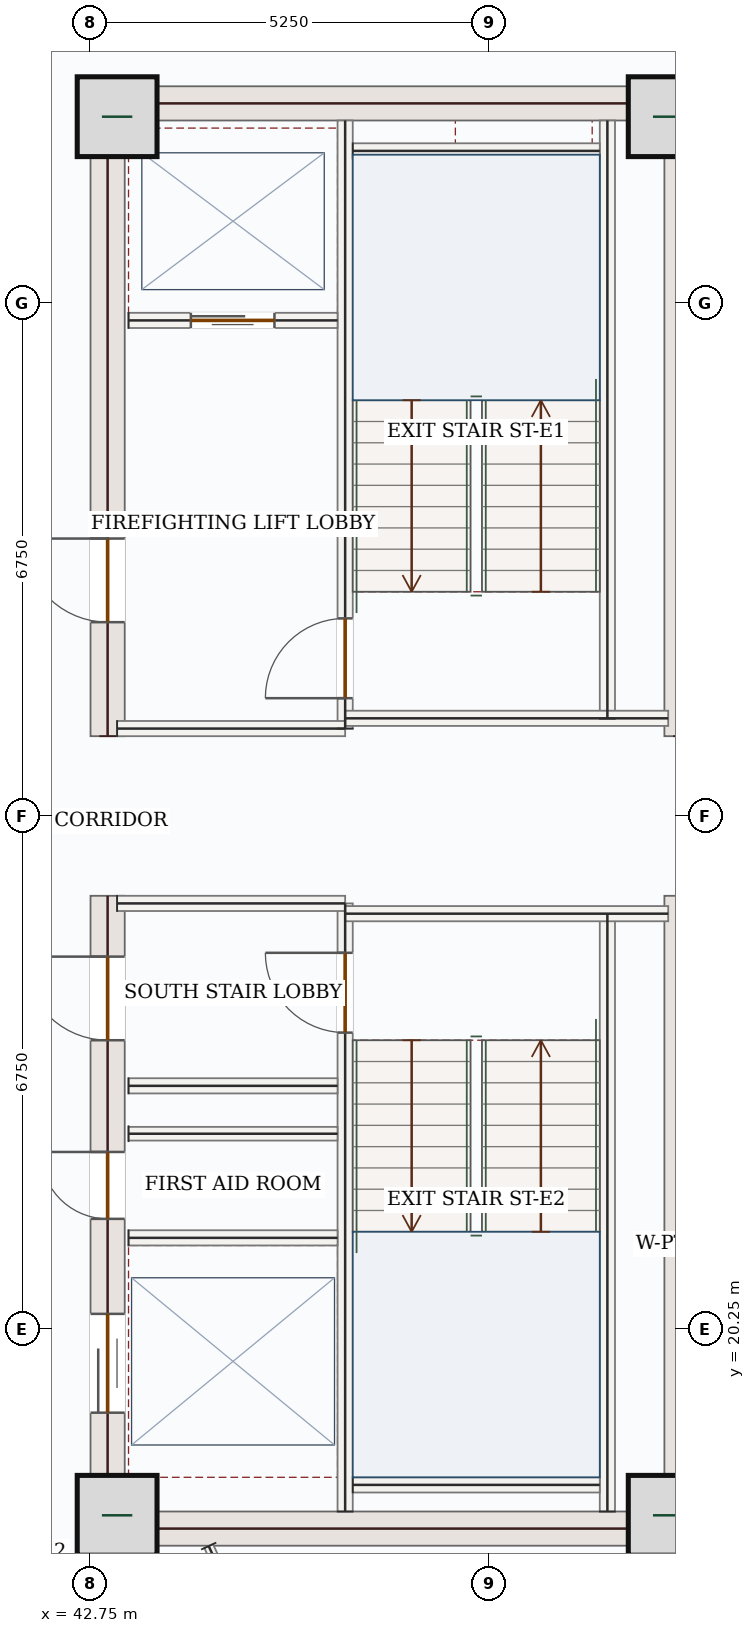
"""IFC4 building model, lengths in metres.
Left out: names, types, materials, properties, quantities, classifications, styles, units other than length and angle.
Written with IfcOpenShell. Run it as: python <this file> out.ifc"""

import sys

from ifc_helpers import new_model, si_unit, direction, frame, frame_2d, origin, origin_2d, place, context, subcontext, project, spatial, rectangle, extrude, source, transform, mapped, element, fill, save


model = new_model("IFC4")
c1 = context("Model", 3, precision=1e-05, world=origin(), true_north=direction((0.0, 1.0)))
c2 = subcontext(c1, "Body", "Model", "MODEL_VIEW")
j1 = project(units=[si_unit("LENGTHUNIT", "METRE"), si_unit("PLANEANGLEUNIT", "RADIAN")], contexts=[c1])
p1 = place(None, origin())
s1 = spatial("IfcSite", under=j1, at=p1, CompositionType="ELEMENT")
p2 = place(p1, origin())
s2 = spatial("IfcBuilding", under=s1, at=p2, CompositionType="ELEMENT")
p3 = place(p2, frame((0.0, 0.0, 246.6)))
s3 = spatial("IfcBuildingStorey", under=s2, at=p3, CompositionType="ELEMENT", Elevation=246.6)
p4 = place(p3, frame((42.975, 17.4, 0.0), z_axis=(0.0, 0.0, 1.0), x_axis=(0.0, 1.0, 0.0)))
e1 = element("IfcWall", 1, at=p4, inside=s3, PredefinedType="SHEAR", context=c2, shape_type="SweptSolid", body=[
    extrude(rectangle(XDim=8.55, YDim=0.45, at=frame_2d((4.275, 0.0))), origin(), (0.0, 0.0, 1.0), 3.5),
])
p5 = place(p4, frame((6.65, 0.0, 0.0)))
e2 = element("IfcOpeningElement", 2, at=p5, cuts=e1, PredefinedType="OPENING", context=c2, shape_type="SweptSolid", body=[
    extrude(rectangle(XDim=1.1, YDim=2.2, at=frame_2d((0.55, 1.1))), frame((0.0, 0.235, 0.0), z_axis=(0.0, -1.0, 0.0), x_axis=(1.0, 0.0, 0.0)), (0.0, 0.0, 1.0), 0.47),
])
p6 = place(p4, frame((1.75, 0.0, 0.0)))
e3 = element("IfcOpeningElement", 3, at=p6, cuts=e1, PredefinedType="OPENING", context=c2, shape_type="SweptSolid", body=[
    extrude(rectangle(XDim=1.3, YDim=2.2, at=frame_2d((0.65, 1.1))), frame((0.0, 0.235, 0.0), z_axis=(0.0, -1.0, 0.0), x_axis=(1.0, 0.0, 0.0)), (0.0, 0.0, 1.0), 0.47),
])
p7 = place(p4, frame((4.3, 0.0, 0.0)))
e4 = element("IfcOpeningElement", 4, at=p7, cuts=e1, PredefinedType="OPENING", context=c2, shape_type="SweptSolid", body=[
    extrude(rectangle(XDim=0.88, YDim=2.1, at=frame_2d((0.44, 1.05))), frame((0.0, 0.235, 0.0), z_axis=(0.0, -1.0, 0.0), x_axis=(1.0, 0.0, 0.0)), (0.0, 0.0, 1.0), 0.47),
])
p8 = place(p3, frame((42.975, 28.05, 0.0), z_axis=(0.0, 0.0, 1.0), x_axis=(0.0, 1.0, 0.0)))
e5 = element("IfcWall", 5, at=p8, inside=s3, PredefinedType="SHEAR", context=c2, shape_type="SweptSolid", body=[
    extrude(rectangle(XDim=8.55, YDim=0.45, at=frame_2d((4.275, 0.0))), origin(), (0.0, 0.0, 1.0), 3.5),
])
p9 = place(p8, frame((1.5, 0.0, 0.0)))
e6 = element("IfcOpeningElement", 6, at=p9, cuts=e5, PredefinedType="OPENING", context=c2, shape_type="SweptSolid", body=[
    extrude(rectangle(XDim=1.1, YDim=2.2, at=frame_2d((0.55, 1.1))), frame((0.0, 0.235, 0.0), z_axis=(0.0, -1.0, 0.0), x_axis=(1.0, 0.0, 0.0)), (0.0, 0.0, 1.0), 0.47),
])
m1 = source(origin(), c2, "Body", "SweptSolid", [
    extrude(rectangle(XDim=8.55, YDim=0.45, at=frame_2d((4.275, 0.0))), origin(), (0.0, 0.0, 1.0), 3.5),
])
for number, where, z_axis, x_axis in (
    (7, (50.525, 17.4, 0.0), (0.0, 0.0, 1.0), (0.0, 1.0, 0.0)),
    (8, (50.525, 28.05, 0.0), (0.0, 0.0, 1.0), (0.0, 1.0, 0.0)),
):
    element("IfcWall", number, at=place(p3, frame(where, z_axis=z_axis, x_axis=x_axis)), inside=s3, PredefinedType="SHEAR", context=c2, shape_type="MappedRepresentation", body=[
        mapped(m1, transform((0.0, 0.0, 0.0), x_axis=(1.0, 0.0, 0.0), y_axis=(0.0, 1.0, 0.0), z_axis=(0.0, 0.0, 1.0), scale=1.0)),
    ])
m2 = source(origin(), c2, "Body", "SweptSolid", [
    extrude(rectangle(XDim=7.1, YDim=0.45, at=frame_2d((3.55, 0.0))), origin(), (0.0, 0.0, 1.0), 3.5),
])
for number, where, z_axis, x_axis in (
    (9, (43.2, 17.625, 0.0), (0.0, 0.0, 1.0), (1.0, 0.0, 0.0)),
    (10, (43.2, 36.375, 0.0), (0.0, 0.0, 1.0), (1.0, 0.0, 0.0)),
):
    element("IfcWall", number, at=place(p3, frame(where, z_axis=z_axis, x_axis=x_axis)), inside=s3, PredefinedType="SHEAR", context=c2, shape_type="MappedRepresentation", body=[
        mapped(m2, transform((0.0, 0.0, 0.0), x_axis=(1.0, 0.0, 0.0), y_axis=(0.0, 1.0, 0.0), z_axis=(0.0, 0.0, 1.0), scale=1.0)),
    ])
m3 = source(origin(), c2, "Body", "SweptSolid", [
    extrude(rectangle(XDim=1.05, YDim=1.05, at=origin_2d()), origin(), (0.0, 0.0, 1.0), 3.75),
])
for number, where, z_axis, x_axis in (
    (11, (43.1, 17.8, 0.0), (0.0, 0.0, 1.0), (1.0, 0.0, 0.0)),
    (12, (50.35, 17.8, 0.0), (0.0, 0.0, 1.0), (1.0, 0.0, 0.0)),
    (13, (43.1, 36.2, 0.0), (0.0, 0.0, 1.0), (1.0, 0.0, 0.0)),
    (14, (50.35, 36.2, 0.0), (0.0, 0.0, 1.0), (1.0, 0.0, 0.0)),
):
    element("IfcColumn", number, at=place(p3, frame(where, z_axis=z_axis, x_axis=x_axis)), inside=s3, PredefinedType="COLUMN", context=c2, shape_type="MappedRepresentation", body=[
        mapped(m3, transform((0.0, 0.0, 0.0), x_axis=(1.0, 0.0, 0.0), y_axis=(0.0, 1.0, 0.0), z_axis=(0.0, 0.0, 1.0), scale=1.0)),
    ])
p10 = place(p3, frame((53.06, 18.458, 0.0), z_axis=(0.0, 0.0, 1.0), x_axis=(-0.707106781187, -0.707106781187, 0.0)))
e15 = element("IfcWall", 15, at=p10, inside=s3, PredefinedType="SOLIDWALL", context=c2, shape_type="SweptSolid", body=[
    extrude(rectangle(XDim=5.258, YDim=0.28, at=frame_2d((2.629, 0.0))), origin(), (0.0, 0.0, 1.0), 3.5),
])
p11 = place(p10, frame((1.879, 0.0, 0.85)))
e16 = element("IfcOpeningElement", 16, at=p11, cuts=e15, PredefinedType="OPENING", context=c2, shape_type="SweptSolid", body=[
    extrude(rectangle(XDim=1.5, YDim=1.5, at=frame_2d((0.75, 0.75))), frame((0.0, 0.15, 0.0), z_axis=(0.0, -1.0, 0.0), x_axis=(1.0, 0.0, 0.0)), (0.0, 0.0, 1.0), 0.3),
])
m4 = source(origin(), c2, "Body", "SweptSolid", [
    extrude(rectangle(XDim=7.87, YDim=0.2, at=frame_2d((3.935, 0.0))), origin(), (0.0, 0.0, 1.0), 3.5),
])
for number, where, z_axis, x_axis in (
    (17, (49.55, 17.85, 0.0), (0.0, 0.0, 1.0), (0.0, 1.0, 0.0)),
    (18, (49.55, 28.28, 0.0), (0.0, 0.0, 1.0), (0.0, 1.0, 0.0)),
):
    element("IfcWall", number, at=place(p3, frame(where, z_axis=z_axis, x_axis=x_axis)), inside=s3, PredefinedType="SOLIDWALL", context=c2, shape_type="MappedRepresentation", body=[
        mapped(m4, transform((0.0, 0.0, 0.0), x_axis=(1.0, 0.0, 0.0), y_axis=(0.0, 1.0, 0.0), z_axis=(0.0, 0.0, 1.0), scale=1.0)),
    ])
p12 = place(p3, frame((46.1, 17.85, 0.0), z_axis=(0.0, 0.0, 1.0), x_axis=(0.0, 1.0, 0.0)))
e19 = element("IfcWall", 19, at=p12, inside=s3, PredefinedType="SOLIDWALL", context=c2, shape_type="SweptSolid", body=[
    extrude(rectangle(XDim=8.0, YDim=0.2, at=frame_2d((4.0, 0.0))), origin(), (0.0, 0.0, 1.0), 3.5),
])
p13 = place(p12, frame((6.3, 0.0, 0.0)))
e20 = element("IfcOpeningElement", 20, at=p13, cuts=e19, PredefinedType="OPENING", context=c2, shape_type="SweptSolid", body=[
    extrude(rectangle(XDim=1.05, YDim=2.15, at=frame_2d((0.525, 1.075))), frame((0.0, 0.11, 0.0), z_axis=(0.0, -1.0, 0.0), x_axis=(1.0, 0.0, 0.0)), (0.0, 0.0, 1.0), 0.22),
])
p14 = place(p3, frame((46.1, 28.15, 0.0), z_axis=(0.0, 0.0, 1.0), x_axis=(0.0, 1.0, 0.0)))
e21 = element("IfcWall", 21, at=p14, inside=s3, PredefinedType="SOLIDWALL", context=c2, shape_type="SweptSolid", body=[
    extrude(rectangle(XDim=8.0, YDim=0.2, at=frame_2d((4.0, 0.0))), origin(), (0.0, 0.0, 1.0), 3.5),
])
p15 = place(p14, frame((0.4, 0.0, 0.0)))
e22 = element("IfcOpeningElement", 22, at=p15, cuts=e21, PredefinedType="OPENING", context=c2, shape_type="SweptSolid", body=[
    extrude(rectangle(XDim=1.05, YDim=2.15, at=frame_2d((0.525, 1.075))), frame((0.0, 0.11, 0.0), z_axis=(0.0, -1.0, 0.0), x_axis=(1.0, 0.0, 0.0)), (0.0, 0.0, 1.0), 0.22),
])
m5 = source(origin(), c2, "Body", "SweptSolid", [
    extrude(rectangle(XDim=3.0, YDim=0.2, at=frame_2d((1.5, 0.0))), origin(), (0.0, 0.0, 1.0), 3.5),
])
p16 = place(p3, frame((43.1, 25.85, 0.0), z_axis=(0.0, 0.0, 1.0), x_axis=(1.0, 0.0, 0.0)))
e23 = element("IfcWall", 23, at=p16, inside=s3, PredefinedType="SOLIDWALL", context=c2, shape_type="MappedRepresentation", body=[
    mapped(m5, transform((0.0, 0.0, 0.0), x_axis=(1.0, 0.0, 0.0), y_axis=(0.0, 1.0, 0.0), z_axis=(0.0, 0.0, 1.0), scale=1.0)),
])
m6 = source(origin(), c2, "Body", "SweptSolid", [
    extrude(rectangle(XDim=4.25, YDim=0.2, at=frame_2d((2.125, 0.0))), origin(), (0.0, 0.0, 1.0), 3.5),
])
p17 = place(p3, frame((46.1, 25.715, 0.0), z_axis=(0.0, 0.0, 1.0), x_axis=(1.0, 0.0, 0.0)))
e24 = element("IfcWall", 24, at=p17, inside=s3, PredefinedType="SOLIDWALL", context=c2, shape_type="MappedRepresentation", body=[
    mapped(m6, transform((0.0, 0.0, 0.0), x_axis=(1.0, 0.0, 0.0), y_axis=(0.0, 1.0, 0.0), z_axis=(0.0, 0.0, 1.0), scale=1.0)),
])
p18 = place(p3, frame((43.1, 28.15, 0.0), z_axis=(0.0, 0.0, 1.0), x_axis=(1.0, 0.0, 0.0)))
e25 = element("IfcWall", 25, at=p18, inside=s3, PredefinedType="SOLIDWALL", context=c2, shape_type="MappedRepresentation", body=[
    mapped(m5, transform((0.0, 0.0, 0.0), x_axis=(1.0, 0.0, 0.0), y_axis=(0.0, 1.0, 0.0), z_axis=(0.0, 0.0, 1.0), scale=1.0)),
])
p19 = place(p3, frame((46.1, 28.285, 0.0), z_axis=(0.0, 0.0, 1.0), x_axis=(1.0, 0.0, 0.0)))
e26 = element("IfcWall", 26, at=p19, inside=s3, PredefinedType="SOLIDWALL", context=c2, shape_type="MappedRepresentation", body=[
    mapped(m6, transform((0.0, 0.0, 0.0), x_axis=(1.0, 0.0, 0.0), y_axis=(0.0, 1.0, 0.0), z_axis=(0.0, 0.0, 1.0), scale=1.0)),
])
m7 = source(origin(), c2, "Body", "SweptSolid", [
    extrude(rectangle(XDim=3.25, YDim=0.2, at=frame_2d((1.625, 0.0))), origin(), (0.0, 0.0, 1.0), 3.5),
])
for number, where, z_axis, x_axis in (
    (27, (46.2, 35.75, 0.0), (0.0, 0.0, 1.0), (1.0, 0.0, 0.0)),
    (28, (46.2, 18.2, 0.0), (0.0, 0.0, 1.0), (1.0, 0.0, 0.0)),
):
    element("IfcWall", number, at=place(p3, frame(where, z_axis=z_axis, x_axis=x_axis)), inside=s3, PredefinedType="SOLIDWALL", context=c2, shape_type="MappedRepresentation", body=[
        mapped(m7, transform((0.0, 0.0, 0.0), x_axis=(1.0, 0.0, 0.0), y_axis=(0.0, 1.0, 0.0), z_axis=(0.0, 0.0, 1.0), scale=1.0)),
    ])
p20 = place(p3, frame((43.25, 33.52, 0.0), z_axis=(0.0, 0.0, 1.0), x_axis=(1.0, 0.0, 0.0)))
e29 = element("IfcWall", 29, at=p20, inside=s3, PredefinedType="SOLIDWALL", context=c2, shape_type="SweptSolid", body=[
    extrude(rectangle(XDim=2.75, YDim=0.2, at=frame_2d((1.375, 0.0))), origin(), (0.0, 0.0, 1.0), 3.5),
])
p21 = place(p20, frame((0.82, 0.0, 0.0)))
e30 = element("IfcOpeningElement", 30, at=p21, cuts=e29, PredefinedType="OPENING", context=c2, shape_type="SweptSolid", body=[
    extrude(rectangle(XDim=1.1, YDim=2.15, at=frame_2d((0.55, 1.075))), frame((0.0, 0.11, 0.0), z_axis=(0.0, -1.0, 0.0), x_axis=(1.0, 0.0, 0.0)), (0.0, 0.0, 1.0), 0.22),
])
m8 = source(origin(), c2, "Body", "SweptSolid", [
    extrude(rectangle(XDim=2.75, YDim=0.2, at=frame_2d((1.375, 0.0))), origin(), (0.0, 0.0, 1.0), 3.5),
])
for number, where, z_axis, x_axis in (
    (31, (43.25, 23.45, 0.0), (0.0, 0.0, 1.0), (1.0, 0.0, 0.0)),
    (32, (43.25, 21.45, 0.0), (0.0, 0.0, 1.0), (1.0, 0.0, 0.0)),
):
    element("IfcWall", number, at=place(p3, frame(where, z_axis=z_axis, x_axis=x_axis)), inside=s3, PredefinedType="SOLIDWALL", context=c2, shape_type="MappedRepresentation", body=[
        mapped(m8, transform((0.0, 0.0, 0.0), x_axis=(1.0, 0.0, 0.0), y_axis=(0.0, 1.0, 0.0), z_axis=(0.0, 0.0, 1.0), scale=1.0)),
    ])
m9 = source(origin(), c2, "Body", "SweptSolid", [
    extrude(rectangle(XDim=2.75, YDim=0.18, at=frame_2d((1.375, 0.0))), origin(), (0.0, 0.0, 1.0), 3.5),
])
p22 = place(p3, frame((43.25, 22.82, 0.0), z_axis=(0.0, 0.0, 1.0), x_axis=(1.0, 0.0, 0.0)))
e33 = element("IfcWall", 33, at=p22, inside=s3, PredefinedType="PARTITIONING", context=c2, shape_type="MappedRepresentation", body=[
    mapped(m9, transform((0.0, 0.0, 0.0), x_axis=(1.0, 0.0, 0.0), y_axis=(0.0, 1.0, 0.0), z_axis=(0.0, 0.0, 1.0), scale=1.0)),
])
m10 = source(origin(), c2, "Body", "SweptSolid", [
    extrude(rectangle(XDim=8.712, YDim=0.125, at=frame_2d((4.356, 0.0))), origin(), (0.0, 0.0, 1.0), 3.5),
])
p23 = place(p3, frame((44.305, 17.395, 0.0), z_axis=(0.0, 0.0, 1.0), x_axis=(0.419438424399, -0.907783789312, 0.0)))
e34 = element("IfcWall", 34, at=p23, inside=s3, PredefinedType="PARTITIONING", context=c2, shape_type="MappedRepresentation", body=[
    mapped(m10, transform((0.0, 0.0, 0.0), x_axis=(1.0, 0.0, 0.0), y_axis=(0.0, 1.0, 0.0), z_axis=(0.0, 0.0, 1.0), scale=1.0)),
])
m11 = source(origin(), c2, "Body", "SweptSolid", [
    extrude(rectangle(XDim=1.05, YDim=2.15, at=frame_2d((0.525, 1.075))), frame((0.0, 0.025, 0.0), z_axis=(0.0, -1.0, 0.0), x_axis=(1.0, 0.0, 0.0)), (0.0, 0.0, 1.0), 0.05),
])
p24 = place(p15, origin())
e35 = element("IfcDoor", 35, at=p24, inside=s3, OperationType="SINGLE_SWING_LEFT", PredefinedType="DOOR", context=c2, shape_type="MappedRepresentation", body=[
    mapped(m11, transform((0.0, 0.0, 0.0), x_axis=(1.0, 0.0, 0.0), y_axis=(0.0, 1.0, 0.0), z_axis=(0.0, 0.0, 1.0), scale=1.0)),
])
fill(e22, e35)
p25 = place(p13, origin())
e36 = element("IfcDoor", 36, at=p25, inside=s3, OperationType="SINGLE_SWING_RIGHT", PredefinedType="DOOR", context=c2, shape_type="MappedRepresentation", body=[
    mapped(m11, transform((0.0, 0.0, 0.0), x_axis=(1.0, 0.0, 0.0), y_axis=(0.0, 1.0, 0.0), z_axis=(0.0, 0.0, 1.0), scale=1.0)),
])
fill(e20, e36)
m12 = source(origin(), c2, "Body", "SweptSolid", [
    extrude(rectangle(XDim=1.1, YDim=2.15, at=frame_2d((0.55, 1.075))), frame((0.0, 0.025, 0.0), z_axis=(0.0, -1.0, 0.0), x_axis=(1.0, 0.0, 0.0)), (0.0, 0.0, 1.0), 0.05),
])
p26 = place(p21, origin())
e37 = element("IfcDoor", 37, at=p26, inside=s3, OperationType="DOUBLE_DOOR_SLIDING", PredefinedType="DOOR", context=c2, shape_type="MappedRepresentation", body=[
    mapped(m12, transform((0.0, 0.0, 0.0), x_axis=(1.0, 0.0, 0.0), y_axis=(0.0, 1.0, 0.0), z_axis=(0.0, 0.0, 1.0), scale=1.0)),
])
fill(e30, e37)
m13 = source(origin(), c2, "Body", "SweptSolid", [
    extrude(rectangle(XDim=1.1, YDim=2.2, at=frame_2d((0.55, 1.1))), frame((0.0, 0.025, 0.0), z_axis=(0.0, -1.0, 0.0), x_axis=(1.0, 0.0, 0.0)), (0.0, 0.0, 1.0), 0.05),
])
p27 = place(p9, origin())
e38 = element("IfcDoor", 38, at=p27, inside=s3, OperationType="SINGLE_SWING_RIGHT", PredefinedType="DOOR", context=c2, shape_type="MappedRepresentation", body=[
    mapped(m13, transform((0.0, 0.0, 0.0), x_axis=(1.0, 0.0, 0.0), y_axis=(0.0, 1.0, 0.0), z_axis=(0.0, 0.0, 1.0), scale=1.0)),
])
fill(e6, e38)
p28 = place(p5, origin())
e39 = element("IfcDoor", 39, at=p28, inside=s3, OperationType="SINGLE_SWING_RIGHT", PredefinedType="DOOR", context=c2, shape_type="MappedRepresentation", body=[
    mapped(m13, transform((0.0, 0.0, 0.0), x_axis=(1.0, 0.0, 0.0), y_axis=(0.0, 1.0, 0.0), z_axis=(0.0, 0.0, 1.0), scale=1.0)),
])
fill(e2, e39)
m14 = source(origin(), c2, "Body", "SweptSolid", [
    extrude(rectangle(XDim=1.3, YDim=2.2, at=frame_2d((0.65, 1.1))), frame((0.0, 0.025, 0.0), z_axis=(0.0, -1.0, 0.0), x_axis=(1.0, 0.0, 0.0)), (0.0, 0.0, 1.0), 0.05),
])
p29 = place(p6, origin())
e40 = element("IfcDoor", 40, at=p29, inside=s3, OperationType="DOUBLE_DOOR_SLIDING", PredefinedType="DOOR", context=c2, shape_type="MappedRepresentation", body=[
    mapped(m14, transform((0.0, 0.0, 0.0), x_axis=(1.0, 0.0, 0.0), y_axis=(0.0, 1.0, 0.0), z_axis=(0.0, 0.0, 1.0), scale=1.0)),
])
fill(e3, e40)
m15 = source(origin(), c2, "Body", "SweptSolid", [
    extrude(rectangle(XDim=0.88, YDim=2.1, at=frame_2d((0.44, 1.05))), frame((0.0, 0.025, 0.0), z_axis=(0.0, -1.0, 0.0), x_axis=(1.0, 0.0, 0.0)), (0.0, 0.0, 1.0), 0.05),
])
p30 = place(p7, origin())
e41 = element("IfcDoor", 41, at=p30, inside=s3, OperationType="SINGLE_SWING_RIGHT", PredefinedType="DOOR", context=c2, shape_type="MappedRepresentation", body=[
    mapped(m15, transform((0.0, 0.0, 0.0), x_axis=(1.0, 0.0, 0.0), y_axis=(0.0, 1.0, 0.0), z_axis=(0.0, 0.0, 1.0), scale=1.0)),
])
fill(e4, e41)
save(model, sys.argv[1])
